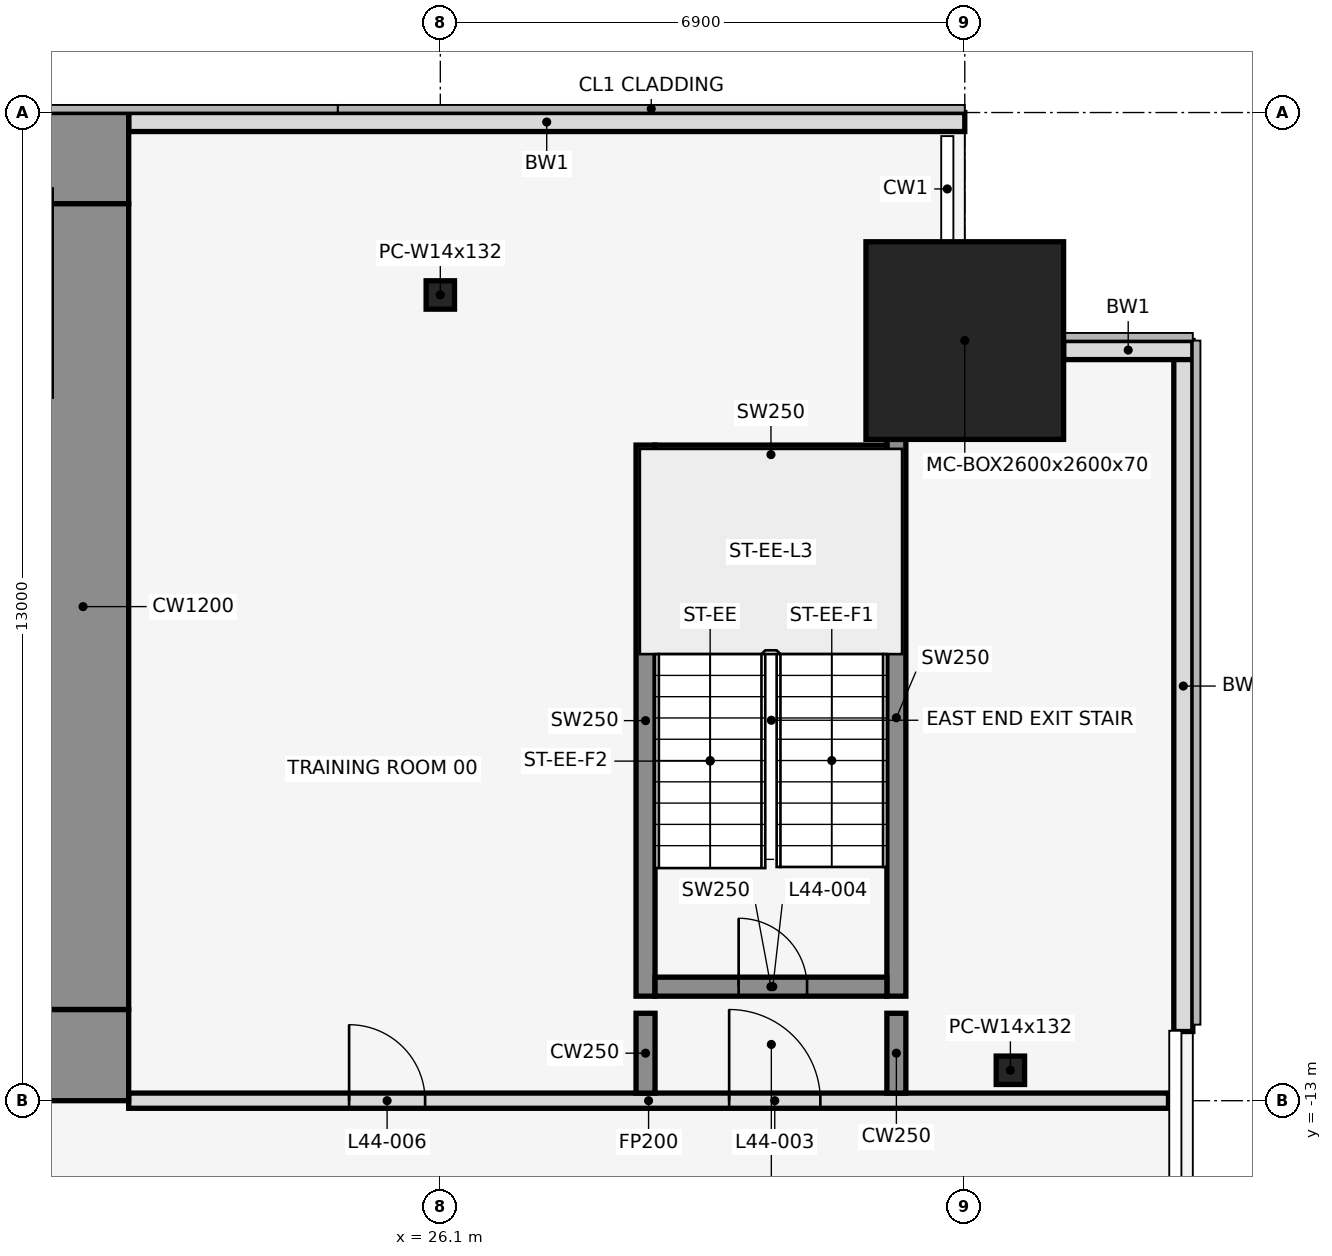
"""IFC4 building model, lengths in metres.
Left out: names, types, materials, properties, quantities, classifications, styles, units other than length and angle.
Written with IfcOpenShell. Run it as: python <this file> out.ifc"""

import sys

from ifc_helpers import new_model, si_unit, direction, frame, frame_2d, origin, origin_2d, place, context, subcontext, project, spatial, rectangle, hollow_rectangle, i_section, extrude, element, fill, save


model = new_model("IFC4")
c1 = context("Model", 3, precision=1e-05, world=origin(), true_north=direction((0.0, 1.0)))
c2 = subcontext(c1, "Body", "Model", "MODEL_VIEW")
j1 = project(units=[si_unit("LENGTHUNIT", "METRE"), si_unit("PLANEANGLEUNIT", "RADIAN")], contexts=[c1])
p1 = place(None, origin())
s1 = spatial("IfcSite", under=j1, at=p1, CompositionType="ELEMENT")
p2 = place(p1, origin())
s2 = spatial("IfcBuilding", under=s1, at=p2, CompositionType="ELEMENT")
p3 = place(p2, frame((0.0, 0.0, 199.1)))
s3 = spatial("IfcBuildingStorey", under=s2, at=p3, CompositionType="ELEMENT", Elevation=199.1)
p4 = place(p3, frame((26.1, -2.4, 0.0), z_axis=(0.0, 0.0, 1.0), x_axis=(1.0, 0.0, 0.0)))
e1 = element("IfcColumn", 1, at=p4, inside=s3, PredefinedType="COLUMN", context=c2, shape_type="SweptSolid", body=[
    extrude(i_section(OverallWidth=0.373, OverallDepth=0.373, WebThickness=0.016, FlangeThickness=0.026, at=origin_2d()), origin(), (0.0, 0.0, 1.0), 4.1),
])
p5 = place(p3, frame((33.0, -3.0, 0.0), z_axis=(0.0, 0.0, 1.0), x_axis=(1.0, 0.0, 0.0)))
e2 = element("IfcColumn", 2, at=p5, inside=s3, PredefinedType="COLUMN", context=c2, shape_type="SweptSolid", body=[
    extrude(hollow_rectangle(XDim=2.6, YDim=2.6, WallThickness=0.07, at=origin_2d()), origin(), (0.0, 0.0, 1.0), 4.1),
])
p6 = place(p3, frame((33.6, -12.6, 0.0), z_axis=(0.0, 0.0, 1.0), x_axis=(1.0, 0.0, 0.0)))
e3 = element("IfcColumn", 3, at=p6, inside=s3, PredefinedType="COLUMN", context=c2, shape_type="SweptSolid", body=[
    extrude(i_section(OverallWidth=0.373, OverallDepth=0.373, WebThickness=0.016, FlangeThickness=0.026, at=origin_2d()), origin(), (0.0, 0.0, 1.0), 4.1),
])
p7 = place(p3, frame((33.0, -0.125, 0.0), z_axis=(0.0, 0.0, 1.0), x_axis=(-1.0, 0.0, 0.0)))
e4 = element("IfcWall", 4, at=p7, inside=s3, PredefinedType="STANDARD", context=c2, shape_type="SweptSolid", body=[
    extrude(rectangle(XDim=11.0, YDim=0.25, at=frame_2d((5.5, 0.0))), origin(), (0.0, 0.0, 1.0), 3.95),
])
p8 = place(p3, frame((35.875, -12.09, 0.0), z_axis=(0.0, 0.0, 1.0), x_axis=(0.0, 1.0, 0.0)))
e5 = element("IfcWall", 5, at=p8, inside=s3, PredefinedType="STANDARD", context=c2, shape_type="SweptSolid", body=[
    extrude(rectangle(XDim=9.09, YDim=0.25, at=frame_2d((4.545, 0.0))), origin(), (0.0, 0.0, 1.0), 3.95),
])
p9 = place(p3, frame((36.0, -3.125, 0.0), z_axis=(0.0, 0.0, 1.0), x_axis=(-1.0, 0.0, 0.0)))
e6 = element("IfcWall", 6, at=p9, inside=s3, PredefinedType="STANDARD", context=c2, shape_type="SweptSolid", body=[
    extrude(rectangle(XDim=1.7, YDim=0.25, at=frame_2d((0.85, 0.0))), origin(), (0.0, 0.0, 1.0), 3.95),
])
p10 = place(p3, frame((28.8, -11.625, 0.0), z_axis=(0.0, 0.0, 1.0), x_axis=(0.0, 1.0, 0.0)))
e7 = element("IfcWall", 7, at=p10, inside=s3, PredefinedType="SHEAR", context=c2, shape_type="SweptSolid", body=[
    extrude(rectangle(XDim=7.25, YDim=0.25, at=frame_2d((3.625, 0.0))), origin(), (0.0, 0.0, 1.0), 4.1),
])
p11 = place(p3, frame((32.1, -11.625, 0.0), z_axis=(0.0, 0.0, 1.0), x_axis=(0.0, 1.0, 0.0)))
e8 = element("IfcWall", 8, at=p11, inside=s3, PredefinedType="SHEAR", context=c2, shape_type="SweptSolid", body=[
    extrude(rectangle(XDim=7.325, YDim=0.25, at=frame_2d((3.663, 0.0))), origin(), (0.0, 0.0, 1.0), 4.1),
])
p12 = place(p3, frame((28.925, -11.5, 0.0), z_axis=(0.0, 0.0, 1.0), x_axis=(1.0, 0.0, 0.0)))
e9 = element("IfcWall", 9, at=p12, inside=s3, PredefinedType="SHEAR", context=c2, shape_type="SweptSolid", body=[
    extrude(rectangle(XDim=3.05, YDim=0.25, at=frame_2d((1.525, 0.0))), origin(), (0.0, 0.0, 1.0), 4.1),
])
p13 = place(p12, frame((1.1, 0.0, 0.0)))
e10 = element("IfcOpeningElement", 10, at=p13, cuts=e9, PredefinedType="OPENING", context=c2, shape_type="SweptSolid", body=[
    extrude(rectangle(XDim=0.9, YDim=2.1, at=frame_2d((0.45, 1.05))), frame((0.0, 0.137, 0.0), z_axis=(0.0, -1.0, 0.0), x_axis=(1.0, 0.0, 0.0)), (0.0, 0.0, 1.0), 0.274),
])
p14 = place(p3, frame((28.925, -4.5, 0.0), z_axis=(0.0, 0.0, 1.0), x_axis=(1.0, 0.0, 0.0)))
e11 = element("IfcWall", 11, at=p14, inside=s3, PredefinedType="SHEAR", context=c2, shape_type="SweptSolid", body=[
    extrude(rectangle(XDim=3.05, YDim=0.25, at=frame_2d((1.525, 0.0))), origin(), (0.0, 0.0, 1.0), 4.1),
])
p15 = place(p3, frame((22.0, -13.0, 0.0), z_axis=(0.0, 0.0, 1.0), x_axis=(1.0, 0.0, 0.0)))
e12 = element("IfcWall", 12, at=p15, inside=s3, PredefinedType="PARTITIONING", context=c2, shape_type="SweptSolid", body=[
    extrude(rectangle(XDim=13.68, YDim=0.2, at=frame_2d((6.84, 0.0))), origin(), (0.0, 0.0, 1.0), 2.84),
])
p16 = place(p15, frame((7.9, 0.0, 0.0)))
e13 = element("IfcOpeningElement", 13, at=p16, cuts=e12, PredefinedType="OPENING", context=c2, shape_type="SweptSolid", body=[
    extrude(rectangle(XDim=1.2, YDim=2.1, at=frame_2d((0.6, 1.05))), frame((0.0, 0.112, 0.0), z_axis=(0.0, -1.0, 0.0), x_axis=(1.0, 0.0, 0.0)), (0.0, 0.0, 1.0), 0.224),
])
p17 = place(p15, frame((2.9, 0.0, 0.0)))
e14 = element("IfcOpeningElement", 14, at=p17, cuts=e12, PredefinedType="OPENING", context=c2, shape_type="SweptSolid", body=[
    extrude(rectangle(XDim=1.0, YDim=2.1, at=frame_2d((0.5, 1.05))), frame((0.0, 0.112, 0.0), z_axis=(0.0, -1.0, 0.0), x_axis=(1.0, 0.0, 0.0)), (0.0, 0.0, 1.0), 0.224),
])
for number, where, z_axis, x_axis in (
    (15, (28.8, -12.9, 0.0), (0.0, 0.0, 1.0), (0.0, 1.0, 0.0)),
    (16, (32.1, -12.9, 0.0), (0.0, 0.0, 1.0), (0.0, 1.0, 0.0)),
):
    element("IfcWall", number, at=place(p3, frame(where, z_axis=z_axis, x_axis=x_axis)), inside=s3, PredefinedType="SHEAR", context=c2, shape_type="SweptSolid", body=[
        extrude(rectangle(XDim=1.05, YDim=0.25, at=frame_2d((0.525, 0.0))), origin(), (0.0, 0.0, 1.0), 4.1),
    ])
p18 = place(p3, frame((-22.0, -0.6, 0.0), z_axis=(0.0, 0.0, 1.0), x_axis=(1.0, 0.0, 0.0)))
e17 = element("IfcWall", 17, at=p18, inside=s3, PredefinedType="SHEAR", context=c2, shape_type="SweptSolid", body=[
    extrude(rectangle(XDim=44.0, YDim=1.2, at=frame_2d((22.0, 0.0))), origin(), (0.0, 0.0, 1.0), 4.1),
])
p19 = place(p18, frame((18.55, 0.0, 0.0)))
e18 = element("IfcOpeningElement", 18, at=p19, cuts=e17, PredefinedType="OPENING", context=c2, shape_type="SweptSolid", body=[
    extrude(rectangle(XDim=0.9, YDim=2.1, at=frame_2d((0.45, 1.05))), frame((0.0, 0.612, 0.0), z_axis=(0.0, -1.0, 0.0), x_axis=(1.0, 0.0, 0.0)), (0.0, 0.0, 1.0), 1.224),
])
p20 = place(p18, frame((24.55, 0.0, 0.0)))
e19 = element("IfcOpeningElement", 19, at=p20, cuts=e17, PredefinedType="OPENING", context=c2, shape_type="SweptSolid", body=[
    extrude(rectangle(XDim=0.9, YDim=2.1, at=frame_2d((0.45, 1.05))), frame((0.0, 0.612, 0.0), z_axis=(0.0, -1.0, 0.0), x_axis=(1.0, 0.0, 0.0)), (0.0, 0.0, 1.0), 1.224),
])
p21 = place(p3, frame((-22.0, -12.4, 0.0), z_axis=(0.0, 0.0, 1.0), x_axis=(1.0, 0.0, 0.0)))
e20 = element("IfcWall", 20, at=p21, inside=s3, PredefinedType="SHEAR", context=c2, shape_type="SweptSolid", body=[
    extrude(rectangle(XDim=44.0, YDim=1.2, at=frame_2d((22.0, 0.0))), origin(), (0.0, 0.0, 1.0), 4.1),
])
p22 = place(p21, frame((2.2, 0.0, 0.0)))
e21 = element("IfcOpeningElement", 21, at=p22, cuts=e20, PredefinedType="OPENING", context=c2, shape_type="SweptSolid", body=[
    extrude(rectangle(XDim=1.2, YDim=2.1, at=frame_2d((0.6, 1.05))), frame((0.0, 0.612, 0.0), z_axis=(0.0, -1.0, 0.0), x_axis=(1.0, 0.0, 0.0)), (0.0, 0.0, 1.0), 1.224),
])
p23 = place(p21, frame((21.4, 0.0, 0.0)))
e22 = element("IfcOpeningElement", 22, at=p23, cuts=e20, PredefinedType="OPENING", context=c2, shape_type="SweptSolid", body=[
    extrude(rectangle(XDim=1.2, YDim=2.1, at=frame_2d((0.6, 1.05))), frame((0.0, 0.612, 0.0), z_axis=(0.0, -1.0, 0.0), x_axis=(1.0, 0.0, 0.0)), (0.0, 0.0, 1.0), 1.224),
])
p24 = place(p21, frame((40.6, 0.0, 0.0)))
e23 = element("IfcOpeningElement", 23, at=p24, cuts=e20, PredefinedType="OPENING", context=c2, shape_type="SweptSolid", body=[
    extrude(rectangle(XDim=1.2, YDim=2.1, at=frame_2d((0.6, 1.05))), frame((0.0, 0.612, 0.0), z_axis=(0.0, -1.0, 0.0), x_axis=(1.0, 0.0, 0.0)), (0.0, 0.0, 1.0), 1.224),
])
p25 = place(p21, frame((16.0, 0.0, 0.0)))
e24 = element("IfcOpeningElement", 24, at=p25, cuts=e20, PredefinedType="OPENING", context=c2, shape_type="SweptSolid", body=[
    extrude(rectangle(XDim=1.8, YDim=2.1, at=frame_2d((0.9, 1.05))), frame((0.0, 0.612, 0.0), z_axis=(0.0, -1.0, 0.0), x_axis=(1.0, 0.0, 0.0)), (0.0, 0.0, 1.0), 1.224),
])
p26 = place(p21, frame((6.3, 0.0, 0.0)))
e25 = element("IfcOpeningElement", 25, at=p26, cuts=e20, PredefinedType="OPENING", context=c2, shape_type="SweptSolid", body=[
    extrude(rectangle(XDim=1.2, YDim=2.1, at=frame_2d((0.6, 1.05))), frame((0.0, 0.612, 0.0), z_axis=(0.0, -1.0, 0.0), x_axis=(1.0, 0.0, 0.0)), (0.0, 0.0, 1.0), 1.224),
])
p27 = place(p21, frame((26.2, 0.0, 0.0)))
e26 = element("IfcOpeningElement", 26, at=p27, cuts=e20, PredefinedType="OPENING", context=c2, shape_type="SweptSolid", body=[
    extrude(rectangle(XDim=1.8, YDim=2.1, at=frame_2d((0.9, 1.05))), frame((0.0, 0.612, 0.0), z_axis=(0.0, -1.0, 0.0), x_axis=(1.0, 0.0, 0.0)), (0.0, 0.0, 1.0), 1.224),
])
p28 = place(p21, frame((36.5, 0.0, 0.0)))
e27 = element("IfcOpeningElement", 27, at=p28, cuts=e20, PredefinedType="OPENING", context=c2, shape_type="SweptSolid", body=[
    extrude(rectangle(XDim=1.2, YDim=2.1, at=frame_2d((0.6, 1.05))), frame((0.0, 0.612, 0.0), z_axis=(0.0, -1.0, 0.0), x_axis=(1.0, 0.0, 0.0)), (0.0, 0.0, 1.0), 1.224),
])
p29 = place(p3, frame((21.4, -11.8, 0.0), z_axis=(0.0, 0.0, 1.0), x_axis=(0.0, 1.0, 0.0)))
e28 = element("IfcWall", 28, at=p29, inside=s3, PredefinedType="SHEAR", context=c2, shape_type="SweptSolid", body=[
    extrude(rectangle(XDim=10.6, YDim=1.2, at=frame_2d((5.3, 0.0))), origin(), (0.0, 0.0, 1.0), 4.1),
])
p30 = place(p16, origin())
e29 = element("IfcDoor", 29, at=p30, inside=s3, OperationType="SINGLE_SWING_RIGHT", PredefinedType="DOOR", context=c2, shape_type="SweptSolid", body=[
    extrude(rectangle(XDim=1.2, YDim=2.1, at=frame_2d((0.6, 1.05))), frame((0.0, 0.025, 0.0), z_axis=(0.0, -1.0, 0.0), x_axis=(1.0, 0.0, 0.0)), (0.0, 0.0, 1.0), 0.05),
])
fill(e13, e29)
p31 = place(p13, origin())
e30 = element("IfcDoor", 30, at=p31, inside=s3, OperationType="SINGLE_SWING_LEFT", PredefinedType="DOOR", context=c2, shape_type="SweptSolid", body=[
    extrude(rectangle(XDim=0.9, YDim=2.1, at=frame_2d((0.45, 1.05))), frame((0.0, 0.025, 0.0), z_axis=(0.0, -1.0, 0.0), x_axis=(1.0, 0.0, 0.0)), (0.0, 0.0, 1.0), 0.05),
])
fill(e10, e30)
p32 = place(p17, origin())
e31 = element("IfcDoor", 31, at=p32, inside=s3, OperationType="SINGLE_SWING_RIGHT", PredefinedType="DOOR", context=c2, shape_type="SweptSolid", body=[
    extrude(rectangle(XDim=1.0, YDim=2.1, at=frame_2d((0.5, 1.05))), frame((0.0, 0.025, 0.0), z_axis=(0.0, -1.0, 0.0), x_axis=(1.0, 0.0, 0.0)), (0.0, 0.0, 1.0), 0.05),
])
fill(e14, e31)
save(model, sys.argv[1])
